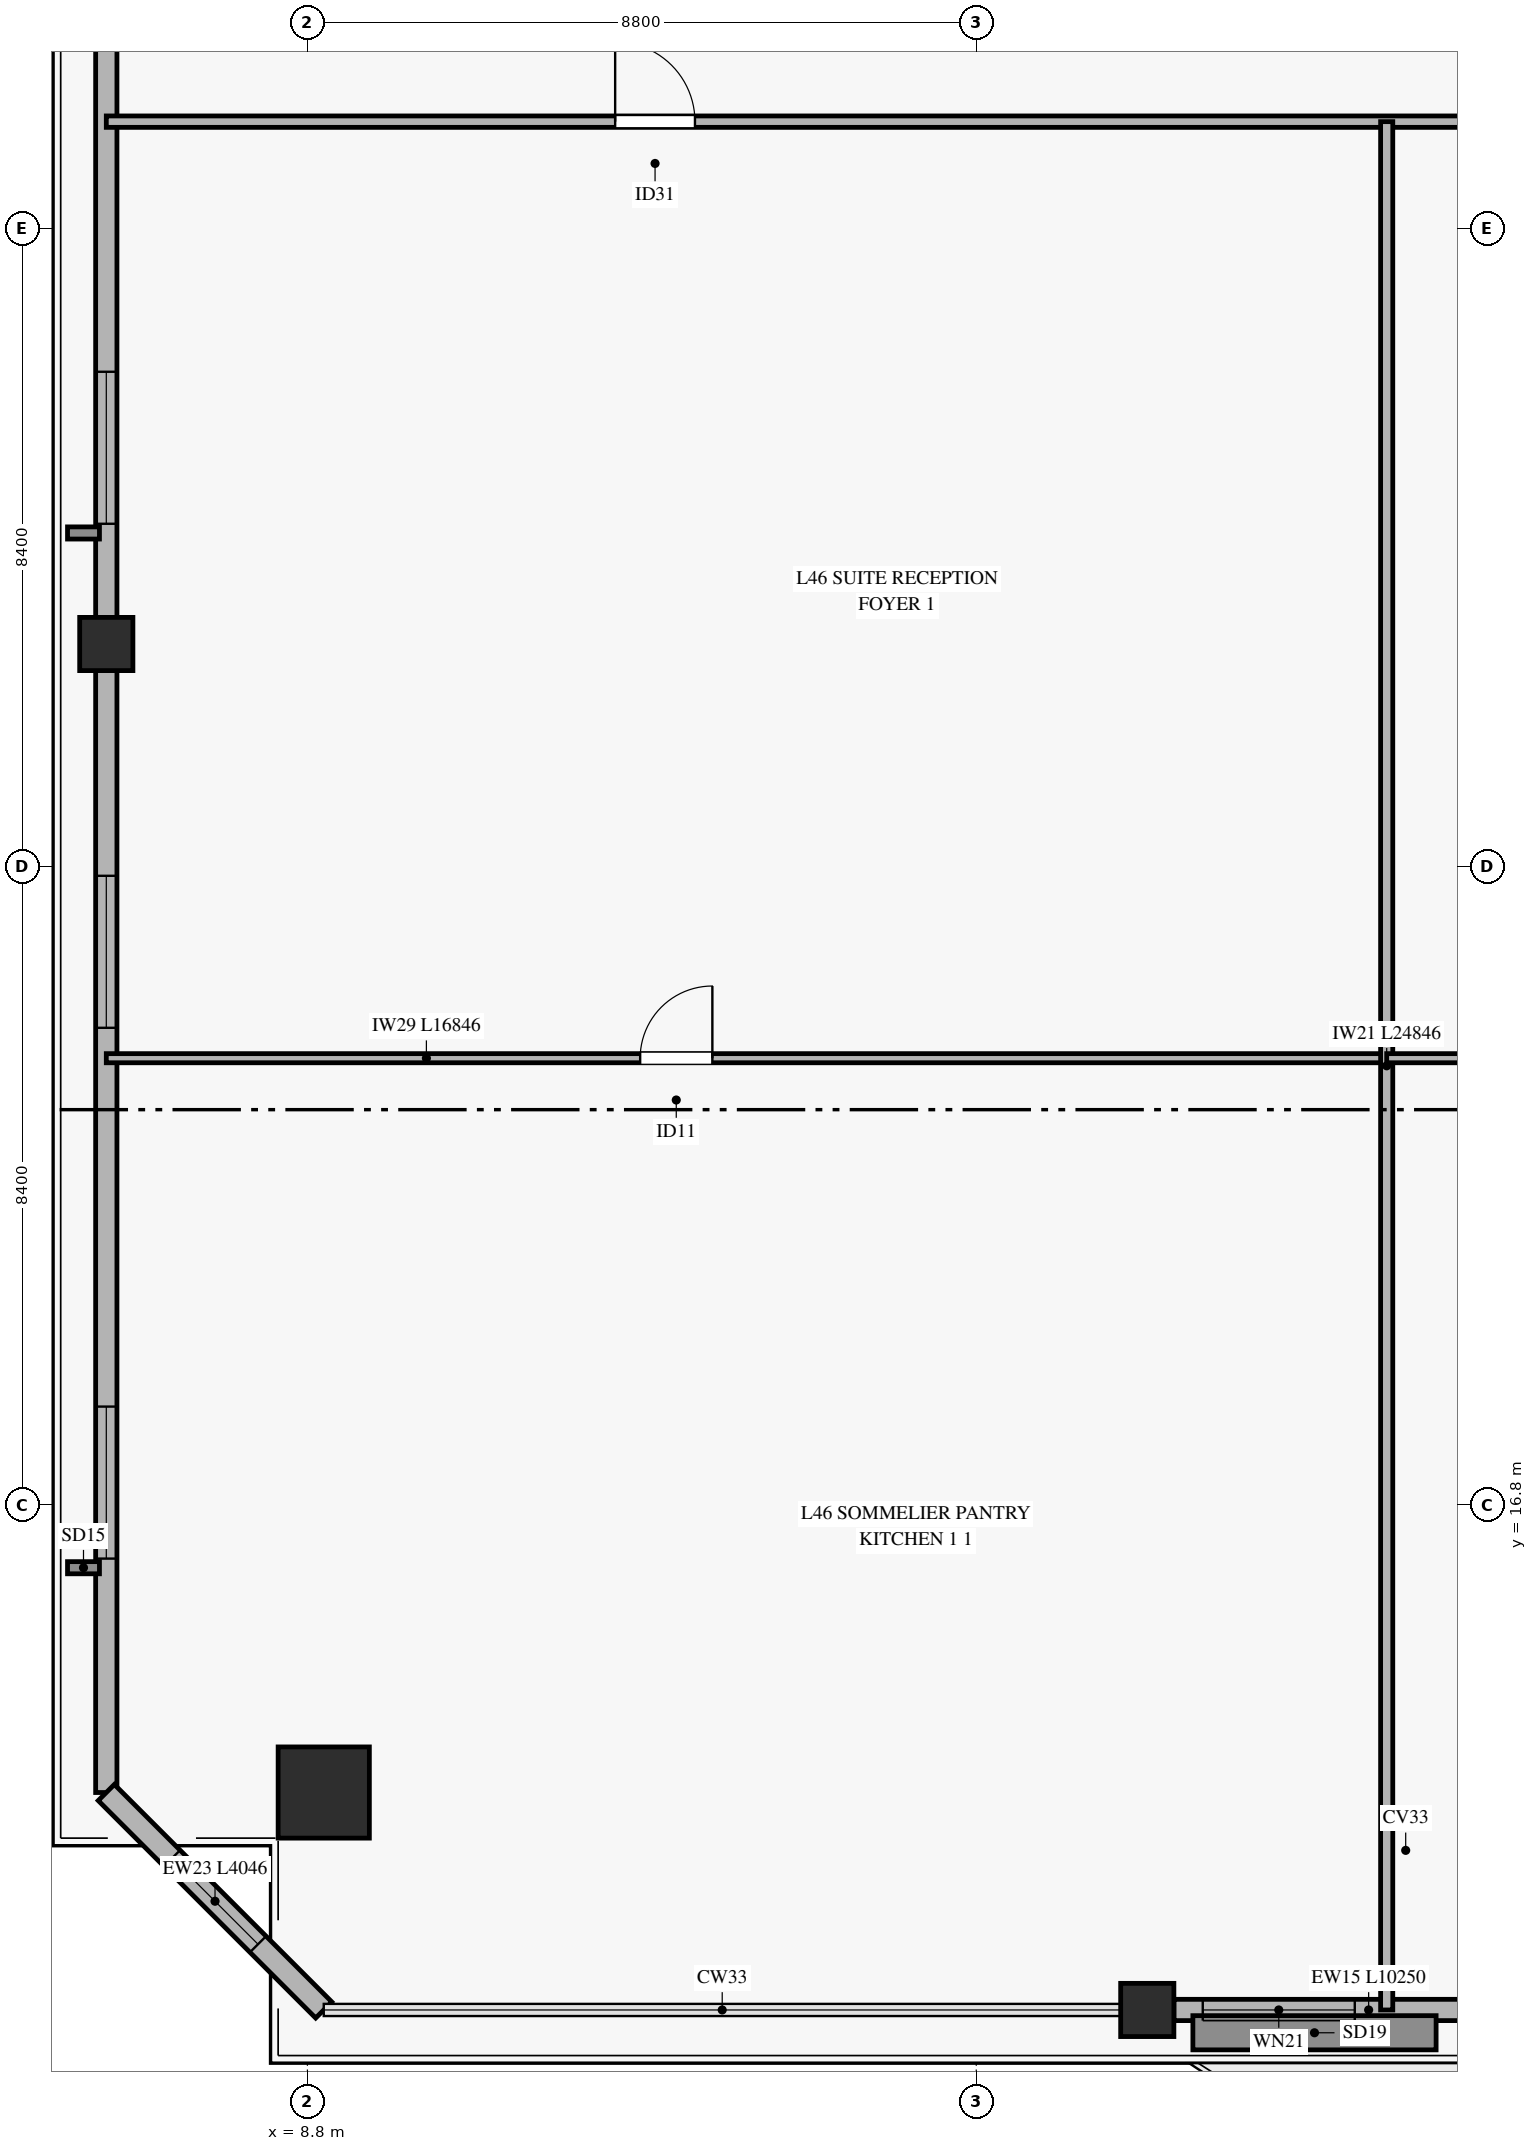
"""IFC4 building model, lengths in metres.
Left out: names, types, materials, properties, quantities, classifications, styles, units other than length and angle.
Written with IfcOpenShell. Run it as: python <this file> out.ifc"""

import sys

from ifc_helpers import new_model, si_unit, direction, frame, frame_2d, origin, origin_2d, place, context, subcontext, project, spatial, rectangle, hollow_rectangle, extrude, source, transform, mapped, element, fill, save


model = new_model("IFC4")
c1 = context("Model", 3, precision=1e-05, world=origin(), true_north=direction((0.0, 1.0)))
c2 = subcontext(c1, "Body", "Model", "MODEL_VIEW")
j1 = project(units=[si_unit("LENGTHUNIT", "METRE"), si_unit("PLANEANGLEUNIT", "RADIAN")], contexts=[c1])
p1 = place(None, origin())
s1 = spatial("IfcSite", under=j1, at=p1, CompositionType="ELEMENT")
p2 = place(p1, origin())
s2 = spatial("IfcBuilding", under=s1, at=p2, CompositionType="ELEMENT")
p3 = place(p2, frame((0.0, 0.0, 184.2)))
s3 = spatial("IfcBuildingStorey", under=s2, at=p3, CompositionType="ELEMENT", Elevation=184.2)
m1 = source(origin(), c2, "Body", "SweptSolid", [
    extrude(hollow_rectangle(XDim=1.2, YDim=1.2, WallThickness=0.055, at=origin_2d()), origin(), (0.0, 0.0, 1.0), 3.27),
])
p4 = place(p3, frame((9.015, 13.015, 0.0), z_axis=(0.0, 0.0, 1.0), x_axis=(1.0, 0.0, 0.0)))
e1 = element("IfcColumn", 1, at=p4, inside=s3, PredefinedType="COLUMN", context=c2, shape_type="MappedRepresentation", body=[
    mapped(m1, transform((0.0, 0.0, 0.0), x_axis=(1.0, 0.0, 0.0), y_axis=(0.0, 1.0, 0.0), z_axis=(0.0, 0.0, 1.0), scale=1.0)),
])
m2 = source(origin(), c2, "Body", "SweptSolid", [
    extrude(hollow_rectangle(XDim=0.7, YDim=0.7, WallThickness=0.032, at=origin_2d()), origin(), (0.0, 0.0, 1.0), 3.27),
])
for number, where, z_axis, x_axis in (
    (2, (19.85, 10.154, 0.0), (0.0, 0.0, 1.0), (1.0, 0.0, 0.0)),
    (3, (6.154, 28.127, 0.0), (0.0, 0.0, 1.0), (1.0, 0.0, 0.0)),
):
    element("IfcColumn", number, at=place(p3, frame(where, z_axis=z_axis, x_axis=x_axis)), inside=s3, PredefinedType="COLUMN", context=c2, shape_type="MappedRepresentation", body=[
        mapped(m2, transform((0.0, 0.0, 0.0), x_axis=(1.0, 0.0, 0.0), y_axis=(0.0, 1.0, 0.0), z_axis=(0.0, 0.0, 1.0), scale=1.0)),
    ])
p5 = place(p3, frame((20.2, 10.154, 0.0), z_axis=(0.0, 0.0, 1.0), x_axis=(1.0, 0.0, 0.0)))
e4 = element("IfcWall", 4, at=p5, inside=s3, PredefinedType="SOLIDWALL", context=c2, shape_type="SweptSolid", body=[
    extrude(rectangle(XDim=10.25, YDim=0.28, at=frame_2d((5.125, 0.0))), origin(), (0.0, 0.0, 1.0), 2.75),
])
p6 = place(p5, frame((4.2, 0.0, 0.0)))
e5 = element("IfcOpeningElement", 5, at=p6, cuts=e4, PredefinedType="OPENING", context=c2, shape_type="SweptSolid", body=[
    extrude(rectangle(XDim=1.8, YDim=2.25, at=frame_2d((0.9, 1.125))), frame((0.0, 0.15, 0.0), z_axis=(0.0, -1.0, 0.0), x_axis=(1.0, 0.0, 0.0)), (0.0, 0.0, 1.0), 0.3),
])
p7 = place(p5, frame((0.38, 0.0, 0.45)))
e6 = element("IfcOpeningElement", 6, at=p7, cuts=e4, PredefinedType="OPENING", context=c2, shape_type="SweptSolid", body=[
    extrude(rectangle(XDim=2.0, YDim=2.0, at=frame_2d((1.0, 1.0))), frame((0.0, 0.15, 0.0), z_axis=(0.0, -1.0, 0.0), x_axis=(1.0, 0.0, 0.0)), (0.0, 0.0, 1.0), 0.3),
])
p8 = place(p5, frame((7.35, 0.0, 0.45)))
e7 = element("IfcOpeningElement", 7, at=p8, cuts=e4, PredefinedType="OPENING", context=c2, shape_type="SweptSolid", body=[
    extrude(rectangle(XDim=1.6, YDim=2.0, at=frame_2d((0.8, 1.0))), frame((0.0, 0.15, 0.0), z_axis=(0.0, -1.0, 0.0), x_axis=(1.0, 0.0, 0.0)), (0.0, 0.0, 1.0), 0.3),
])
p9 = place(p3, frame((6.154, 13.015, 0.0), z_axis=(0.0, 0.0, 1.0), x_axis=(0.0, 1.0, 0.0)))
e8 = element("IfcWall", 8, at=p9, inside=s3, PredefinedType="SOLIDWALL", context=c2, shape_type="SweptSolid", body=[
    extrude(rectangle(XDim=14.762, YDim=0.28, at=frame_2d((7.381, 0.0))), origin(), (0.0, 0.0, 1.0), 2.75),
])
p10 = place(p9, frame((3.078, 0.0, 0.45)))
e9 = element("IfcOpeningElement", 9, at=p10, cuts=e8, PredefinedType="OPENING", context=c2, shape_type="SweptSolid", body=[
    extrude(rectangle(XDim=2.0, YDim=2.0, at=frame_2d((1.0, 1.0))), frame((0.0, 0.15, 0.0), z_axis=(0.0, -1.0, 0.0), x_axis=(1.0, 0.0, 0.0)), (0.0, 0.0, 1.0), 0.3),
])
p11 = place(p9, frame((10.062, 0.0, 0.45)))
e10 = element("IfcOpeningElement", 10, at=p11, cuts=e8, PredefinedType="OPENING", context=c2, shape_type="SweptSolid", body=[
    extrude(rectangle(XDim=2.0, YDim=2.0, at=frame_2d((1.0, 1.0))), frame((0.0, 0.15, 0.0), z_axis=(0.0, -1.0, 0.0), x_axis=(1.0, 0.0, 0.0)), (0.0, 0.0, 1.0), 0.3),
])
p12 = place(p3, frame((6.154, 28.477, 0.0), z_axis=(0.0, 0.0, 1.0), x_axis=(0.0, 1.0, 0.0)))
e11 = element("IfcWall", 11, at=p12, inside=s3, PredefinedType="SOLIDWALL", context=c2, shape_type="SweptSolid", body=[
    extrude(rectangle(XDim=14.762, YDim=0.28, at=frame_2d((7.381, 0.0))), origin(), (0.0, 0.0, 1.0), 2.75),
])
p13 = place(p12, frame((1.232, 0.0, 0.45)))
e12 = element("IfcOpeningElement", 12, at=p13, cuts=e11, PredefinedType="OPENING", context=c2, shape_type="SweptSolid", body=[
    extrude(rectangle(XDim=2.0, YDim=2.0, at=frame_2d((1.0, 1.0))), frame((0.0, 0.15, 0.0), z_axis=(0.0, -1.0, 0.0), x_axis=(1.0, 0.0, 0.0)), (0.0, 0.0, 1.0), 0.3),
])
p14 = place(p12, frame((11.487, 0.0, 0.45)))
e13 = element("IfcOpeningElement", 13, at=p14, cuts=e11, PredefinedType="OPENING", context=c2, shape_type="SweptSolid", body=[
    extrude(rectangle(XDim=2.0, YDim=2.0, at=frame_2d((1.0, 1.0))), frame((0.0, 0.15, 0.0), z_axis=(0.0, -1.0, 0.0), x_axis=(1.0, 0.0, 0.0)), (0.0, 0.0, 1.0), 0.3),
])
p15 = place(p3, frame((6.154, 13.015, 0.0), z_axis=(0.0, 0.0, 1.0), x_axis=(0.707106781187, -0.707106781187, 0.0)))
e14 = element("IfcWall", 14, at=p15, inside=s3, PredefinedType="SOLIDWALL", context=c2, shape_type="SweptSolid", body=[
    extrude(rectangle(XDim=4.046, YDim=0.3, at=frame_2d((2.023, 0.0))), origin(), (0.0, 0.0, 1.0), 2.75),
])
p16 = place(p15, frame((1.223, 0.0, 0.45)))
e15 = element("IfcOpeningElement", 15, at=p16, cuts=e14, PredefinedType="OPENING", context=c2, shape_type="SweptSolid", body=[
    extrude(rectangle(XDim=1.6, YDim=2.0, at=frame_2d((0.8, 1.0))), frame((0.0, 0.16, 0.0), z_axis=(0.0, -1.0, 0.0), x_axis=(1.0, 0.0, 0.0)), (0.0, 0.0, 1.0), 0.32),
])
p17 = place(p3, frame((6.154, 35.0, 0.0), z_axis=(0.0, 0.0, 1.0), x_axis=(1.0, 0.0, 0.0)))
e16 = element("IfcWall", 16, at=p17, inside=s3, PredefinedType="PARTITIONING", context=c2, shape_type="SweptSolid", body=[
    extrude(rectangle(XDim=58.093, YDim=0.15, at=frame_2d((29.046, 0.0))), origin(), (0.0, 0.0, 1.0), 2.455),
])
p18 = place(p17, frame((6.695, 0.0, 0.0)))
e17 = element("IfcOpeningElement", 17, at=p18, cuts=e16, PredefinedType="OPENING", context=c2, shape_type="SweptSolid", body=[
    extrude(rectangle(XDim=1.05, YDim=2.15, at=frame_2d((0.525, 1.075))), frame((0.0, 0.085, 0.0), z_axis=(0.0, -1.0, 0.0), x_axis=(1.0, 0.0, 0.0)), (0.0, 0.0, 1.0), 0.17),
])
p19 = place(p17, frame((19.523, 0.0, 0.0)))
e18 = element("IfcOpeningElement", 18, at=p19, cuts=e16, PredefinedType="OPENING", context=c2, shape_type="SweptSolid", body=[
    extrude(rectangle(XDim=1.05, YDim=2.15, at=frame_2d((0.525, 1.075))), frame((0.0, 0.085, 0.0), z_axis=(0.0, -1.0, 0.0), x_axis=(1.0, 0.0, 0.0)), (0.0, 0.0, 1.0), 0.17),
])
p20 = place(p17, frame((26.123, 0.0, 0.0)))
e19 = element("IfcOpeningElement", 19, at=p20, cuts=e16, PredefinedType="OPENING", context=c2, shape_type="SweptSolid", body=[
    extrude(rectangle(XDim=1.05, YDim=2.15, at=frame_2d((0.525, 1.075))), frame((0.0, 0.085, 0.0), z_axis=(0.0, -1.0, 0.0), x_axis=(1.0, 0.0, 0.0)), (0.0, 0.0, 1.0), 0.17),
])
p21 = place(p17, frame((32.616, 0.0, 0.0)))
e20 = element("IfcOpeningElement", 20, at=p21, cuts=e16, PredefinedType="OPENING", context=c2, shape_type="SweptSolid", body=[
    extrude(rectangle(XDim=1.05, YDim=2.15, at=frame_2d((0.525, 1.075))), frame((0.0, 0.085, 0.0), z_axis=(0.0, -1.0, 0.0), x_axis=(1.0, 0.0, 0.0)), (0.0, 0.0, 1.0), 0.17),
])
p22 = place(p17, frame((44.889, 0.0, 0.0)))
e21 = element("IfcOpeningElement", 21, at=p22, cuts=e16, PredefinedType="OPENING", context=c2, shape_type="SweptSolid", body=[
    extrude(rectangle(XDim=1.05, YDim=2.15, at=frame_2d((0.525, 1.075))), frame((0.0, 0.085, 0.0), z_axis=(0.0, -1.0, 0.0), x_axis=(1.0, 0.0, 0.0)), (0.0, 0.0, 1.0), 0.17),
])
p23 = place(p3, frame((6.154, 22.677, 0.0), z_axis=(0.0, 0.0, 1.0), x_axis=(1.0, 0.0, 0.0)))
e22 = element("IfcWall", 22, at=p23, inside=s3, PredefinedType="PARTITIONING", context=c2, shape_type="SweptSolid", body=[
    extrude(rectangle(XDim=16.846, YDim=0.12, at=frame_2d((8.423, 0.0))), origin(), (0.0, 0.0, 1.0), 2.455),
])
p24 = place(p23, frame((7.024, 0.0, 0.0)))
e23 = element("IfcOpeningElement", 23, at=p24, cuts=e22, PredefinedType="OPENING", context=c2, shape_type="SweptSolid", body=[
    extrude(rectangle(XDim=0.95, YDim=2.1, at=frame_2d((0.475, 1.05))), frame((0.0, 0.07, 0.0), z_axis=(0.0, -1.0, 0.0), x_axis=(1.0, 0.0, 0.0)), (0.0, 0.0, 1.0), 0.14),
])
p25 = place(p3, frame((23.0, 10.154, 0.0), z_axis=(0.0, 0.0, 1.0), x_axis=(0.0, 1.0, 0.0)))
e24 = element("IfcWall", 24, at=p25, inside=s3, PredefinedType="PARTITIONING", context=c2, shape_type="SweptSolid", body=[
    extrude(rectangle(XDim=24.846, YDim=0.16, at=frame_2d((12.423, 0.0))), origin(), (0.0, 0.0, 1.0), 2.755),
])
p26 = place(p3, frame((23.0, 22.677, 0.0), z_axis=(0.0, 0.0, 1.0), x_axis=(1.0, 0.0, 0.0)))
e25 = element("IfcWall", 25, at=p26, inside=s3, PredefinedType="PARTITIONING", context=c2, shape_type="SweptSolid", body=[
    extrude(rectangle(XDim=6.6, YDim=0.12, at=frame_2d((3.3, 0.0))), origin(), (0.0, 0.0, 1.0), 3.27),
])
p27 = place(p26, frame((2.806, 0.0, 0.0)))
e26 = element("IfcOpeningElement", 26, at=p27, cuts=e25, PredefinedType="OPENING", context=c2, shape_type="SweptSolid", body=[
    extrude(rectangle(XDim=0.95, YDim=2.1, at=frame_2d((0.475, 1.05))), frame((0.0, 0.07, 0.0), z_axis=(0.0, -1.0, 0.0), x_axis=(1.0, 0.0, 0.0)), (0.0, 0.0, 1.0), 0.14),
])
m3 = source(origin(), c2, "Body", "SweptSolid", [
    extrude(rectangle(XDim=2.0, YDim=2.0, at=frame_2d((1.0, 1.0))), frame((0.0, 0.03, 0.0), z_axis=(0.0, -1.0, 0.0), x_axis=(1.0, 0.0, 0.0)), (0.0, 0.0, 1.0), 0.06),
])
p28 = place(p7, origin())
e27 = element("IfcWindow", 27, at=p28, inside=s3, PartitioningType="SINGLE_PANEL", PredefinedType="WINDOW", context=c2, shape_type="MappedRepresentation", body=[
    mapped(m3, transform((0.0, 0.0, 0.0), x_axis=(1.0, 0.0, 0.0), y_axis=(0.0, 1.0, 0.0), z_axis=(0.0, 0.0, 1.0), scale=1.0)),
])
fill(e6, e27)
p29 = place(p10, origin())
e28 = element("IfcWindow", 28, at=p29, inside=s3, PartitioningType="SINGLE_PANEL", PredefinedType="WINDOW", context=c2, shape_type="MappedRepresentation", body=[
    mapped(m3, transform((0.0, 0.0, 0.0), x_axis=(1.0, 0.0, 0.0), y_axis=(0.0, 1.0, 0.0), z_axis=(0.0, 0.0, 1.0), scale=1.0)),
])
fill(e9, e28)
p30 = place(p11, origin())
e29 = element("IfcWindow", 29, at=p30, inside=s3, PartitioningType="SINGLE_PANEL", PredefinedType="WINDOW", context=c2, shape_type="MappedRepresentation", body=[
    mapped(m3, transform((0.0, 0.0, 0.0), x_axis=(1.0, 0.0, 0.0), y_axis=(0.0, 1.0, 0.0), z_axis=(0.0, 0.0, 1.0), scale=1.0)),
])
fill(e10, e29)
p31 = place(p13, origin())
e30 = element("IfcWindow", 30, at=p31, inside=s3, PartitioningType="SINGLE_PANEL", PredefinedType="WINDOW", context=c2, shape_type="MappedRepresentation", body=[
    mapped(m3, transform((0.0, 0.0, 0.0), x_axis=(1.0, 0.0, 0.0), y_axis=(0.0, 1.0, 0.0), z_axis=(0.0, 0.0, 1.0), scale=1.0)),
])
fill(e12, e30)
m4 = source(origin(), c2, "Body", "SweptSolid", [
    extrude(rectangle(XDim=1.6, YDim=2.0, at=frame_2d((0.8, 1.0))), frame((0.0, 0.03, 0.0), z_axis=(0.0, -1.0, 0.0), x_axis=(1.0, 0.0, 0.0)), (0.0, 0.0, 1.0), 0.06),
])
p32 = place(p16, origin())
e31 = element("IfcWindow", 31, at=p32, inside=s3, PartitioningType="SINGLE_PANEL", PredefinedType="WINDOW", context=c2, shape_type="MappedRepresentation", body=[
    mapped(m4, transform((0.0, 0.0, 0.0), x_axis=(1.0, 0.0, 0.0), y_axis=(0.0, 1.0, 0.0), z_axis=(0.0, 0.0, 1.0), scale=1.0)),
])
fill(e15, e31)
m5 = source(origin(), c2, "Body", "SweptSolid", [
    extrude(rectangle(XDim=1.05, YDim=2.15, at=frame_2d((0.525, 1.075))), frame((0.0, 0.025, 0.0), z_axis=(0.0, -1.0, 0.0), x_axis=(1.0, 0.0, 0.0)), (0.0, 0.0, 1.0), 0.05),
])
p33 = place(p18, origin())
e32 = element("IfcDoor", 32, at=p33, inside=s3, OperationType="SINGLE_SWING_LEFT", PredefinedType="DOOR", context=c2, shape_type="MappedRepresentation", body=[
    mapped(m5, transform((0.0, 0.0, 0.0), x_axis=(1.0, 0.0, 0.0), y_axis=(0.0, 1.0, 0.0), z_axis=(0.0, 0.0, 1.0), scale=1.0)),
])
fill(e17, e32)
m6 = source(origin(), c2, "Body", "SweptSolid", [
    extrude(rectangle(XDim=0.95, YDim=2.1, at=frame_2d((0.475, 1.05))), frame((0.0, 0.025, 0.0), z_axis=(0.0, -1.0, 0.0), x_axis=(1.0, 0.0, 0.0)), (0.0, 0.0, 1.0), 0.05),
])
p34 = place(p24, origin())
e33 = element("IfcDoor", 33, at=p34, inside=s3, OperationType="SINGLE_SWING_RIGHT", PredefinedType="DOOR", context=c2, shape_type="MappedRepresentation", body=[
    mapped(m6, transform((0.0, 0.0, 0.0), x_axis=(1.0, 0.0, 0.0), y_axis=(0.0, 1.0, 0.0), z_axis=(0.0, 0.0, 1.0), scale=1.0)),
])
fill(e23, e33)
save(model, sys.argv[1])
